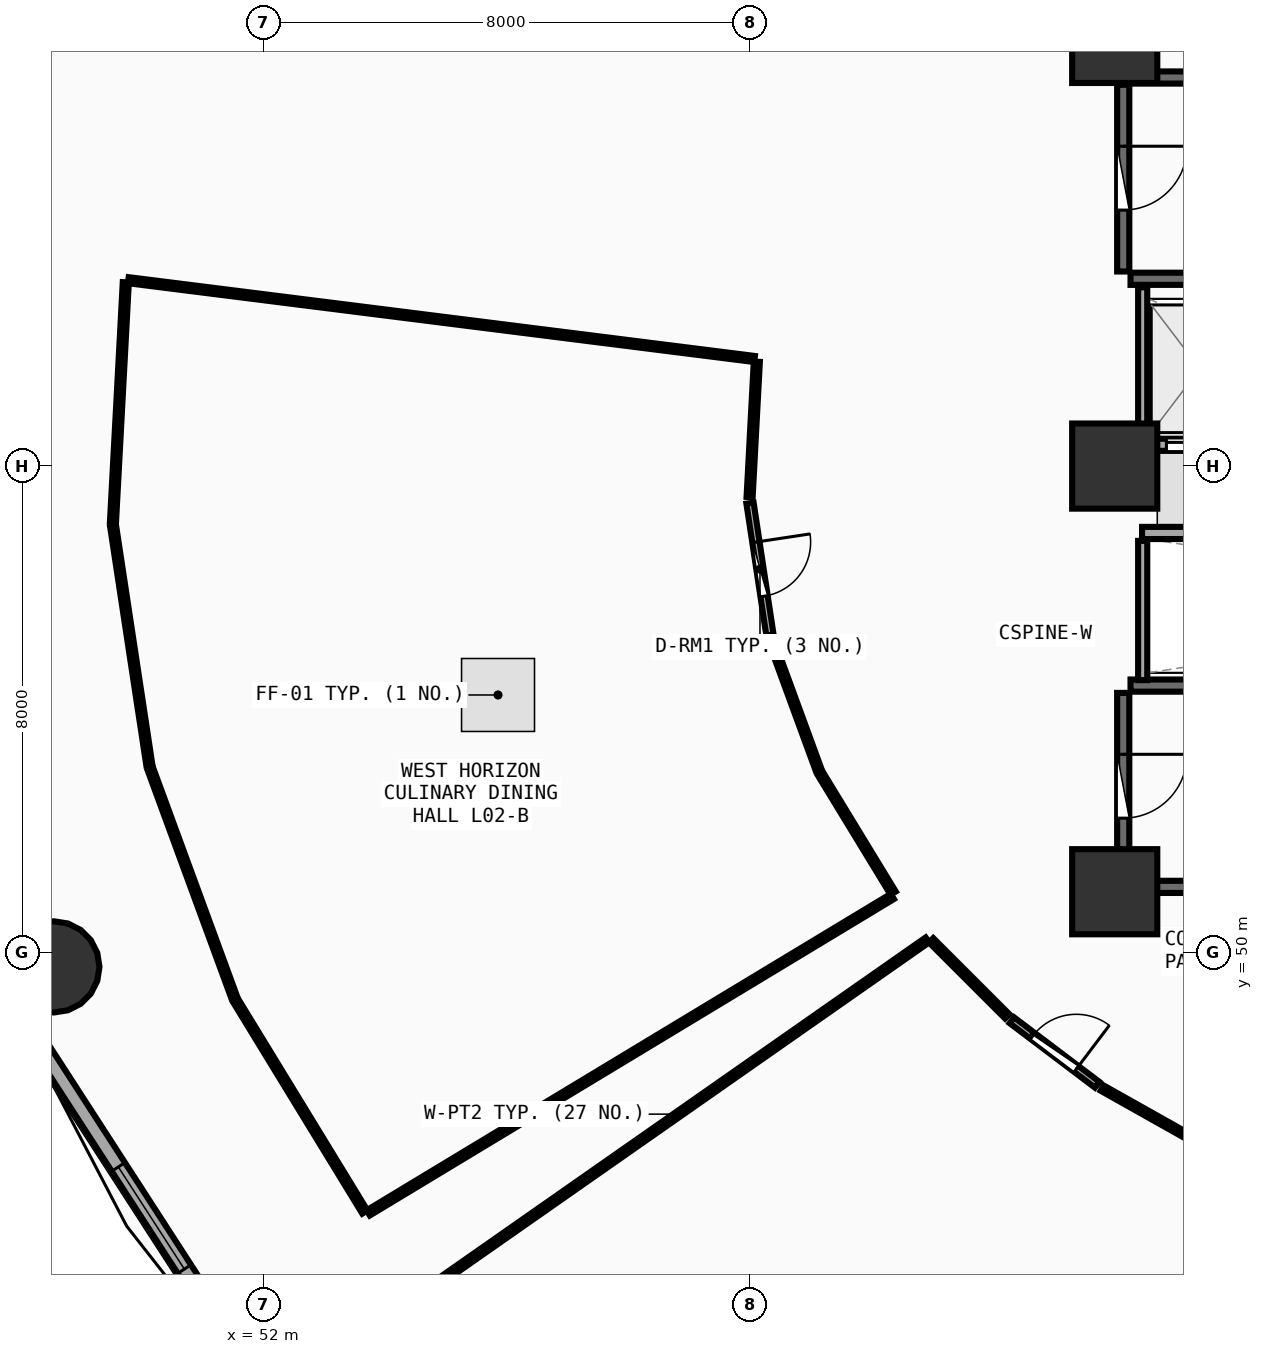
"""IFC4 building model, lengths in metres.
Left out: names, types, materials, properties, quantities, classifications, styles, units other than length and angle.
Written with IfcOpenShell. Run it as: python <this file> out.ifc"""

import sys

from ifc_helpers import new_model, si_unit, direction, frame, frame_2d, origin, origin_2d, place, context, subcontext, project, spatial, rectangle, circle, extrude, element, fill, save


model = new_model("IFC4")
c1 = context("Model", 3, precision=1e-05, world=origin(), true_north=direction((0.0, 1.0)))
c2 = subcontext(c1, "Body", "Model", "MODEL_VIEW")
j1 = project(units=[si_unit("LENGTHUNIT", "METRE"), si_unit("PLANEANGLEUNIT", "RADIAN")], contexts=[c1])
p1 = place(None, origin())
s1 = spatial("IfcSite", under=j1, at=p1, CompositionType="ELEMENT")
p2 = place(p1, origin())
s2 = spatial("IfcBuilding", under=s1, at=p2, CompositionType="ELEMENT")
p3 = place(p2, frame((0.0, 0.0, 9.0)))
s3 = spatial("IfcBuildingStorey", under=s2, at=p3, CompositionType="ELEMENT", Elevation=9.0)
for number, where, z_axis, x_axis in (
    (1, (66.0, 51.0, 0.0), (0.0, 0.0, 1.0), (1.0, 0.0, 0.0)),
    (2, (66.0, 65.0, 0.0), (0.0, 0.0, 1.0), (1.0, 0.0, 0.0)),
    (3, (66.0, 58.0, 0.0), (0.0, 0.0, 1.0), (1.0, 0.0, 0.0)),
):
    element("IfcColumn", number, at=place(p3, frame(where, z_axis=z_axis, x_axis=x_axis)), inside=s3, PredefinedType="PILASTER", context=c2, shape_type="SweptSolid", body=[
        extrude(rectangle(XDim=1.4, YDim=1.4, at=origin_2d()), origin(), (0.0, 0.0, 1.0), 4.5),
    ])
p4 = place(p3, frame((48.553, 49.764, 0.0), z_axis=(0.0, 0.0, 1.0), x_axis=(1.0, 0.0, 0.0)))
e4 = element("IfcColumn", 4, at=p4, inside=s3, PredefinedType="COLUMN", context=c2, shape_type="SweptSolid", body=[
    extrude(circle(Radius=0.75, at=origin_2d()), origin(), (0.0, 0.0, 1.0), 4.5),
])
p5 = place(p3, frame((48.001, 48.967, 0.0), z_axis=(0.0, 0.0, 1.0), x_axis=(0.543005114258, -0.839729388488, 0.0)))
e5 = element("IfcWall", 5, at=p5, inside=s3, PredefinedType="SOLIDWALL", context=c2, shape_type="SweptSolid", body=[
    extrude(rectangle(XDim=7.938, YDim=0.26, at=frame_2d((3.969, 0.0))), origin(), (0.0, 0.0, 1.0), 4.085),
])
p6 = place(p5, frame((2.969, 0.0, 0.85)))
e6 = element("IfcOpeningElement", 6, at=p6, cuts=e5, PredefinedType="OPENING", context=c2, shape_type="SweptSolid", body=[
    extrude(rectangle(XDim=2.0, YDim=1.75, at=frame_2d((1.0, 0.875))), frame((0.0, 0.14, 0.0), z_axis=(0.0, -1.0, 0.0), x_axis=(1.0, 0.0, 0.0)), (0.0, 0.0, 1.0), 0.28),
])
for number, where, z_axis, x_axis in (
    (7, (66.26, 61.08, 0.0), (0.0, 0.0, 1.0), (1.0, 0.0, 0.0)),
    (8, (73.42, 64.39, 0.0), (0.0, 0.0, 1.0), (-1.0, 0.0, 0.0)),
):
    element("IfcWall", number, at=place(p3, frame(where, z_axis=z_axis, x_axis=x_axis)), inside=s3, PredefinedType="SHEAR", context=c2, shape_type="SweptSolid", body=[
        extrude(rectangle(XDim=7.16, YDim=0.2, at=frame_2d((3.58, 0.0))), origin(), (0.0, 0.0, 1.0), 4.1),
    ])
p7 = place(p3, frame((66.14, 64.27, 0.0), z_axis=(0.0, 0.0, 1.0), x_axis=(0.0, -1.0, 0.0)))
e9 = element("IfcWall", 9, at=p7, inside=s3, PredefinedType="SHEAR", context=c2, shape_type="SweptSolid", body=[
    extrude(rectangle(XDim=3.07, YDim=0.2, at=frame_2d((1.535, 0.0))), origin(), (0.0, 0.0, 1.0), 4.1),
])
p8 = place(p7, frame((1.01, 0.0, 0.0)))
e10 = element("IfcOpeningElement", 10, at=p8, cuts=e9, PredefinedType="OPENING", context=c2, shape_type="SweptSolid", body=[
    extrude(rectangle(XDim=1.05, YDim=2.1, at=frame_2d((0.525, 1.05))), frame((0.0, 0.11, 0.0), z_axis=(0.0, -1.0, 0.0), x_axis=(1.0, 0.0, 0.0)), (0.0, 0.0, 1.0), 0.22),
])
for number, where, z_axis, x_axis in (
    (11, (66.26, 51.08, 0.0), (0.0, 0.0, 1.0), (1.0, 0.0, 0.0)),
    (12, (73.42, 54.39, 0.0), (0.0, 0.0, 1.0), (-1.0, 0.0, 0.0)),
):
    element("IfcWall", number, at=place(p3, frame(where, z_axis=z_axis, x_axis=x_axis)), inside=s3, PredefinedType="SHEAR", context=c2, shape_type="SweptSolid", body=[
        extrude(rectangle(XDim=7.16, YDim=0.2, at=frame_2d((3.58, 0.0))), origin(), (0.0, 0.0, 1.0), 4.1),
    ])
p9 = place(p3, frame((66.14, 54.27, 0.0), z_axis=(0.0, 0.0, 1.0), x_axis=(0.0, -1.0, 0.0)))
e13 = element("IfcWall", 13, at=p9, inside=s3, PredefinedType="SHEAR", context=c2, shape_type="SweptSolid", body=[
    extrude(rectangle(XDim=3.07, YDim=0.2, at=frame_2d((1.535, 0.0))), origin(), (0.0, 0.0, 1.0), 4.1),
])
p10 = place(p9, frame((1.01, 0.0, 0.0)))
e14 = element("IfcOpeningElement", 14, at=p10, cuts=e13, PredefinedType="OPENING", context=c2, shape_type="SweptSolid", body=[
    extrude(rectangle(XDim=1.05, YDim=2.1, at=frame_2d((0.525, 1.05))), frame((0.0, 0.11, 0.0), z_axis=(0.0, -1.0, 0.0), x_axis=(1.0, 0.0, 0.0)), (0.0, 0.0, 1.0), 0.22),
])
p11 = place(p3, frame((66.45, 58.35, 0.0), z_axis=(0.0, 0.0, 1.0), x_axis=(1.0, 0.0, 0.0)))
e15 = element("IfcWall", 15, at=p11, inside=s3, PredefinedType="SOLIDWALL", context=c2, shape_type="SweptSolid", body=[
    extrude(rectangle(XDim=6.0, YDim=0.2, at=frame_2d((3.0, 0.0))), origin(), (0.0, 0.0, 1.0), 4.09),
])
p12 = place(p11, frame((0.4, 0.0, 0.0)))
e16 = element("IfcOpeningElement", 16, at=p12, cuts=e15, PredefinedType="OPENING", context=c2, shape_type="SweptSolid", body=[
    extrude(rectangle(XDim=1.1, YDim=2.1, at=frame_2d((0.55, 1.05))), frame((0.0, 0.11, 0.0), z_axis=(0.0, -1.0, 0.0), x_axis=(1.0, 0.0, 0.0)), (0.0, 0.0, 1.0), 0.22),
])
p13 = place(p11, frame((2.4, 0.0, 0.0)))
e17 = element("IfcOpeningElement", 17, at=p13, cuts=e15, PredefinedType="OPENING", context=c2, shape_type="SweptSolid", body=[
    extrude(rectangle(XDim=1.1, YDim=2.1, at=frame_2d((0.55, 1.05))), frame((0.0, 0.11, 0.0), z_axis=(0.0, -1.0, 0.0), x_axis=(1.0, 0.0, 0.0)), (0.0, 0.0, 1.0), 0.22),
])
p14 = place(p11, frame((4.4, 0.0, 0.0)))
e18 = element("IfcOpeningElement", 18, at=p14, cuts=e15, PredefinedType="OPENING", context=c2, shape_type="SweptSolid", body=[
    extrude(rectangle(XDim=1.1, YDim=2.1, at=frame_2d((0.55, 1.05))), frame((0.0, 0.11, 0.0), z_axis=(0.0, -1.0, 0.0), x_axis=(1.0, 0.0, 0.0)), (0.0, 0.0, 1.0), 0.22),
])
p15 = place(p3, frame((66.46, 58.48, 0.0), z_axis=(0.0, 0.0, 1.0), x_axis=(0.0, 1.0, 0.0)))
e19 = element("IfcWall", 19, at=p15, inside=s3, PredefinedType="PARTITIONING", context=c2, shape_type="SweptSolid", body=[
    extrude(rectangle(XDim=2.46, YDim=0.15, at=frame_2d((1.23, 0.0))), origin(), (0.0, 0.0, 1.0), 4.09),
])
p16 = place(p3, frame((66.45, 56.9, 0.0), z_axis=(0.0, 0.0, 1.0), x_axis=(1.0, 0.0, 0.0)))
e20 = element("IfcWall", 20, at=p16, inside=s3, PredefinedType="SOLIDWALL", context=c2, shape_type="SweptSolid", body=[
    extrude(rectangle(XDim=14.4, YDim=0.2, at=frame_2d((7.2, 0.0))), origin(), (0.0, 0.0, 1.0), 4.09),
])
p17 = place(p3, frame((66.46, 54.48, 0.0), z_axis=(0.0, 0.0, 1.0), x_axis=(0.0, 1.0, 0.0)))
e21 = element("IfcWall", 21, at=p17, inside=s3, PredefinedType="PARTITIONING", context=c2, shape_type="SweptSolid", body=[
    extrude(rectangle(XDim=2.29, YDim=0.15, at=frame_2d((1.145, 0.0))), origin(), (0.0, 0.0, 1.0), 4.09),
])
p18 = place(p3, frame((60.002, 57.391, 0.0), z_axis=(0.0, 0.0, 1.0), x_axis=(0.149482487924, -0.988764373248, 0.0)))
e22 = element("IfcWall", 22, at=p18, inside=s3, PredefinedType="PARTITIONING", context=c2, shape_type="SweptSolid", body=[
    extrude(rectangle(XDim=2.195, YDim=0.12, at=frame_2d((1.098, 0.0))), origin(), (0.0, 0.0, 1.0), 4.09),
])
p19 = place(p18, frame((0.648, 0.0, 0.0)))
e23 = element("IfcOpeningElement", 23, at=p19, cuts=e22, PredefinedType="OPENING", context=c2, shape_type="SweptSolid", body=[
    extrude(rectangle(XDim=0.9, YDim=2.08, at=frame_2d((0.45, 1.04))), frame((0.0, 0.07, 0.0), z_axis=(0.0, -1.0, 0.0), x_axis=(1.0, 0.0, 0.0)), (0.0, 0.0, 1.0), 0.14),
])
p20 = place(p3, frame((64.309, 48.886, 0.0), z_axis=(0.0, 0.0, 1.0), x_axis=(0.797861385226, -0.602840949144, 0.0)))
e24 = element("IfcWall", 24, at=p20, inside=s3, PredefinedType="PARTITIONING", context=c2, shape_type="SweptSolid", body=[
    extrude(rectangle(XDim=1.758, YDim=0.12, at=frame_2d((0.879, 0.0))), origin(), (0.0, 0.0, 1.0), 3.485),
])
p21 = place(p20, frame((0.429, 0.0, 0.0)))
e25 = element("IfcOpeningElement", 25, at=p21, cuts=e24, PredefinedType="OPENING", context=c2, shape_type="SweptSolid", body=[
    extrude(rectangle(XDim=0.9, YDim=2.08, at=frame_2d((0.45, 1.04))), frame((0.0, 0.07, 0.0), z_axis=(0.0, -1.0, 0.0), x_axis=(1.0, 0.0, 0.0)), (0.0, 0.0, 1.0), 0.14),
])
p22 = place(p3, frame((60.114, 59.716, 0.0), z_axis=(0.0, 0.0, 1.0), x_axis=(-0.05333481531, -0.998576685826, 0.0)))
e26 = element("IfcWall", 26, at=p22, inside=s3, PredefinedType="PARTITIONING", context=c2, shape_type="SweptSolid", body=[
    extrude(rectangle(XDim=2.229, YDim=0.1, at=frame_2d((1.115, 0.0))), origin(), (0.0, 0.0, 1.0), 3.485),
])
p23 = place(p3, frame((60.353, 55.123, 0.0), z_axis=(0.0, 0.0, 1.0), x_axis=(0.344210122117, -0.938892641271, 0.0)))
e27 = element("IfcWall", 27, at=p23, inside=s3, PredefinedType="PARTITIONING", context=c2, shape_type="SweptSolid", body=[
    extrude(rectangle(XDim=2.256, YDim=0.1, at=frame_2d((1.128, 0.0))), origin(), (0.0, 0.0, 1.0), 4.09),
])
p24 = place(p3, frame((61.164, 52.934, 0.0), z_axis=(0.0, 0.0, 1.0), x_axis=(0.520406594215, -0.853918600745, 0.0)))
e28 = element("IfcWall", 28, at=p24, inside=s3, PredefinedType="PARTITIONING", context=c2, shape_type="SweptSolid", body=[
    extrude(rectangle(XDim=2.291, YDim=0.1, at=frame_2d((1.146, 0.0))), origin(), (0.0, 0.0, 1.0), 4.09),
])
p25 = place(p3, frame((62.343, 50.922, 0.0), z_axis=(0.0, 0.0, 1.0), x_axis=(-0.856094808971, -0.516818805824, 0.0)))
e29 = element("IfcWall", 29, at=p25, inside=s3, PredefinedType="PARTITIONING", context=c2, shape_type="SweptSolid", body=[
    extrude(rectangle(XDim=10.069, YDim=0.1, at=frame_2d((5.034, 0.0))), origin(), (0.0, 0.0, 1.0), 3.485),
])
p26 = place(p3, frame((53.668, 45.732, 0.0), z_axis=(0.0, 0.0, 1.0), x_axis=(-0.521408625916, 0.853307122214, 0.0)))
e30 = element("IfcWall", 30, at=p26, inside=s3, PredefinedType="PARTITIONING", context=c2, shape_type="SweptSolid", body=[
    extrude(rectangle(XDim=4.057, YDim=0.1, at=frame_2d((2.028, 0.0))), origin(), (0.0, 0.0, 1.0), 4.09),
])
p27 = place(p3, frame((51.518, 49.265, 0.0), z_axis=(0.0, 0.0, 1.0), x_axis=(-0.344736099128, 0.938699644166, 0.0)))
e31 = element("IfcWall", 31, at=p27, inside=s3, PredefinedType="PARTITIONING", context=c2, shape_type="SweptSolid", body=[
    extrude(rectangle(XDim=3.993, YDim=0.1, at=frame_2d((1.997, 0.0))), origin(), (0.0, 0.0, 1.0), 3.485),
])
p28 = place(p3, frame((50.122, 53.091, 0.0), z_axis=(0.0, 0.0, 1.0), x_axis=(-0.149955338252, 0.988692771557, 0.0)))
e32 = element("IfcWall", 32, at=p28, inside=s3, PredefinedType="PARTITIONING", context=c2, shape_type="SweptSolid", body=[
    extrude(rectangle(XDim=3.955, YDim=0.1, at=frame_2d((1.977, 0.0))), origin(), (0.0, 0.0, 1.0), 4.09),
])
p29 = place(p3, frame((49.525, 57.08, 0.0), z_axis=(0.0, 0.0, 1.0), x_axis=(0.053366992585, 0.998574966691, 0.0)))
e33 = element("IfcWall", 33, at=p29, inside=s3, PredefinedType="PARTITIONING", context=c2, shape_type="SweptSolid", body=[
    extrude(rectangle(XDim=3.948, YDim=0.1, at=frame_2d((1.974, 0.0))), origin(), (0.0, 0.0, 1.0), 3.485),
])
p30 = place(p3, frame((49.778, 61.057, 0.0), z_axis=(0.0, 0.0, 1.0), x_axis=(0.992176227872, -0.124845235576, 0.0)))
e34 = element("IfcWall", 34, at=p30, inside=s3, PredefinedType="PARTITIONING", context=c2, shape_type="SweptSolid", body=[
    extrude(rectangle(XDim=10.38, YDim=0.1, at=frame_2d((5.19, 0.0))), origin(), (0.0, 0.0, 1.0), 3.785),
])
p31 = place(p3, frame((62.98, 50.202, 0.0), z_axis=(0.0, 0.0, 1.0), x_axis=(0.707382510062, -0.706830944752, 0.0)))
e35 = element("IfcWall", 35, at=p31, inside=s3, PredefinedType="PARTITIONING", context=c2, shape_type="SweptSolid", body=[
    extrude(rectangle(XDim=1.771, YDim=0.1, at=frame_2d((0.885, 0.0))), origin(), (0.0, 0.0, 1.0), 3.485),
])
p32 = place(p3, frame((65.794, 47.771, 0.0), z_axis=(0.0, 0.0, 1.0), x_axis=(0.871593417153, -0.490229451559, 0.0)))
e36 = element("IfcWall", 36, at=p32, inside=s3, PredefinedType="PARTITIONING", context=c2, shape_type="SweptSolid", body=[
    extrude(rectangle(XDim=1.823, YDim=0.1, at=frame_2d((0.912, 0.0))), origin(), (0.0, 0.0, 1.0), 3.485),
])
p33 = place(p3, frame((69.19, 46.104, 0.0), z_axis=(0.0, 0.0, 1.0), x_axis=(-0.376680340497, -0.926343306276, 0.0)))
e37 = element("IfcWall", 37, at=p33, inside=s3, PredefinedType="PARTITIONING", context=c2, shape_type="SweptSolid", body=[
    extrude(rectangle(XDim=9.435, YDim=0.1, at=frame_2d((4.717, 0.0))), origin(), (0.0, 0.0, 1.0), 3.485),
])
p34 = place(p3, frame((54.727, 44.478, 0.0), z_axis=(0.0, 0.0, 1.0), x_axis=(0.819486544078, 0.573098424422, 0.0)))
e38 = element("IfcWall", 38, at=p34, inside=s3, PredefinedType="PARTITIONING", context=c2, shape_type="SweptSolid", body=[
    extrude(rectangle(XDim=9.997, YDim=0.1, at=frame_2d((4.999, 0.0))), origin(), (0.0, 0.0, 1.0), 3.785),
])
p35 = place(p3, frame((66.85, 36.999, 0.0), z_axis=(0.0, 0.0, 1.0), x_axis=(0.323263569932, 0.946308968759, 0.0)))
e39 = element("IfcWall", 39, at=p35, inside=s3, PredefinedType="PARTITIONING", context=c2, shape_type="SweptSolid", body=[
    extrude(rectangle(XDim=9.399, YDim=0.15, at=frame_2d((4.699, 0.0))), origin(), (0.0, 0.0, 1.0), 3.485),
])
p36 = place(p6, origin())
e40 = element("IfcWindow", 40, at=p36, inside=s3, PartitioningType="SINGLE_PANEL", PredefinedType="WINDOW", context=c2, shape_type="SweptSolid", body=[
    extrude(rectangle(XDim=2.0, YDim=1.75, at=frame_2d((1.0, 0.875))), frame((0.0, 0.03, 0.0), z_axis=(0.0, -1.0, 0.0), x_axis=(1.0, 0.0, 0.0)), (0.0, 0.0, 1.0), 0.06),
])
fill(e6, e40)
p37 = place(p8, origin())
e41 = element("IfcDoor", 41, at=p37, inside=s3, OperationType="SINGLE_SWING_LEFT", PredefinedType="DOOR", context=c2, shape_type="SweptSolid", body=[
    extrude(rectangle(XDim=1.05, YDim=2.1, at=frame_2d((0.525, 1.05))), frame((0.0, 0.025, 0.0), z_axis=(0.0, -1.0, 0.0), x_axis=(1.0, 0.0, 0.0)), (0.0, 0.0, 1.0), 0.05),
])
fill(e10, e41)
p38 = place(p10, origin())
e42 = element("IfcDoor", 42, at=p38, inside=s3, OperationType="SINGLE_SWING_LEFT", PredefinedType="DOOR", context=c2, shape_type="SweptSolid", body=[
    extrude(rectangle(XDim=1.05, YDim=2.1, at=frame_2d((0.525, 1.05))), frame((0.0, 0.025, 0.0), z_axis=(0.0, -1.0, 0.0), x_axis=(1.0, 0.0, 0.0)), (0.0, 0.0, 1.0), 0.05),
])
fill(e14, e42)
p39 = place(p12, origin())
e43 = element("IfcDoor", 43, at=p39, inside=s3, OperationType="DOUBLE_DOOR_SLIDING", PredefinedType="DOOR", context=c2, shape_type="SweptSolid", body=[
    extrude(rectangle(XDim=1.1, YDim=2.1, at=frame_2d((0.55, 1.05))), frame((0.0, 0.025, 0.0), z_axis=(0.0, -1.0, 0.0), x_axis=(1.0, 0.0, 0.0)), (0.0, 0.0, 1.0), 0.05),
])
fill(e16, e43)
p40 = place(p19, origin())
e44 = element("IfcDoor", 44, at=p40, inside=s3, OperationType="SINGLE_SWING_LEFT", PredefinedType="DOOR", context=c2, shape_type="SweptSolid", body=[
    extrude(rectangle(XDim=0.9, YDim=2.08, at=frame_2d((0.45, 1.04))), frame((0.0, 0.025, 0.0), z_axis=(0.0, -1.0, 0.0), x_axis=(1.0, 0.0, 0.0)), (0.0, 0.0, 1.0), 0.05),
])
fill(e23, e44)
p41 = place(p21, origin())
e45 = element("IfcDoor", 45, at=p41, inside=s3, OperationType="SINGLE_SWING_RIGHT", PredefinedType="DOOR", context=c2, shape_type="SweptSolid", body=[
    extrude(rectangle(XDim=0.9, YDim=2.08, at=frame_2d((0.45, 1.04))), frame((0.0, 0.025, 0.0), z_axis=(0.0, -1.0, 0.0), x_axis=(1.0, 0.0, 0.0)), (0.0, 0.0, 1.0), 0.05),
])
fill(e25, e45)
save(model, sys.argv[1])
